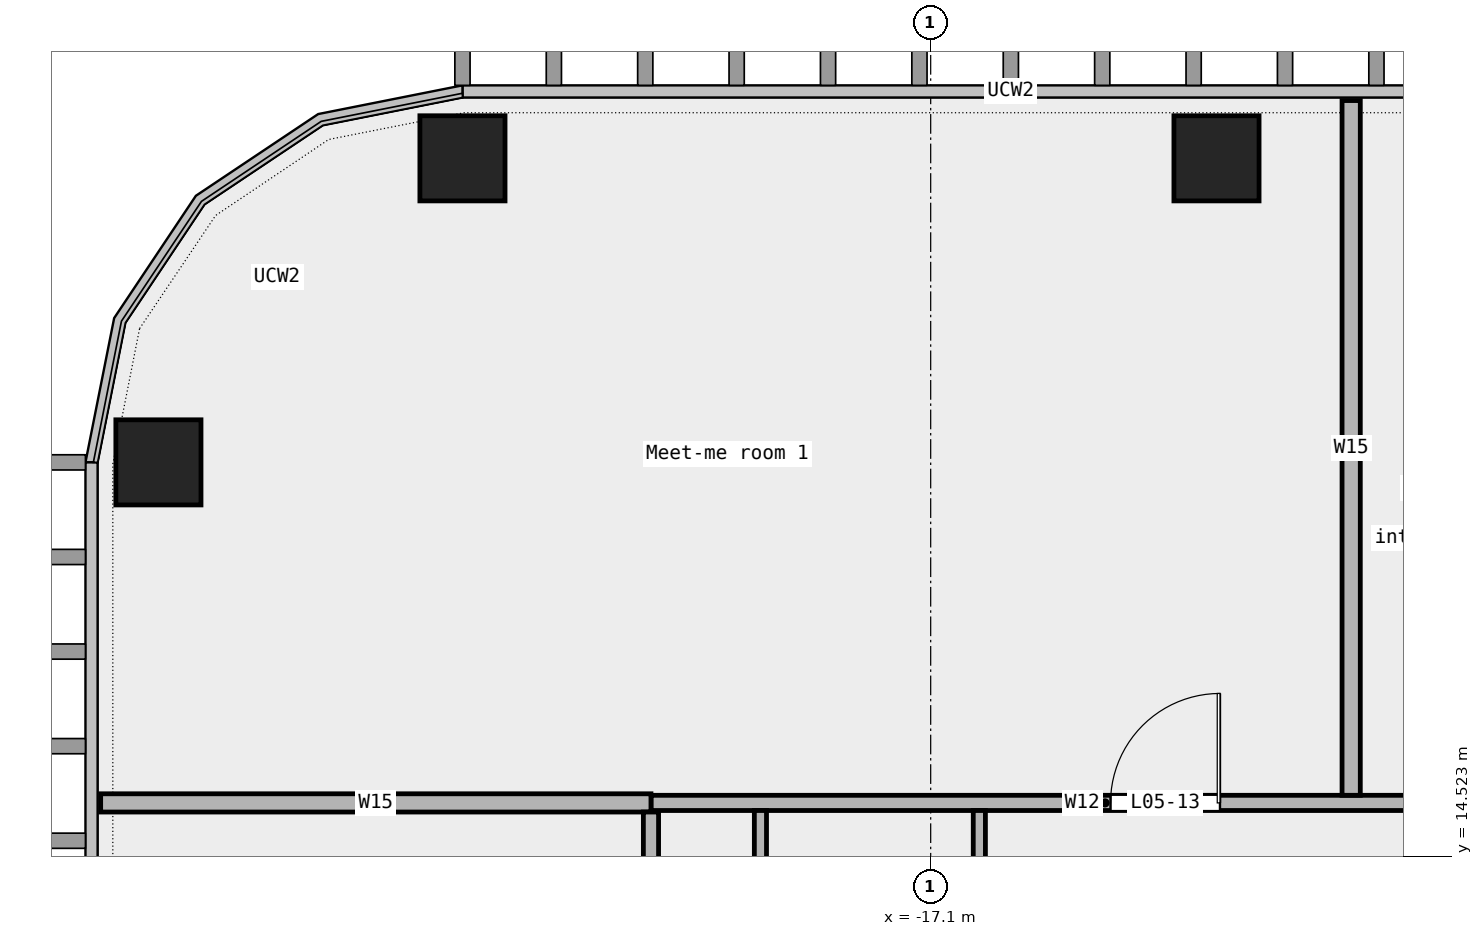
"""IFC4 building model, lengths in metres.
Left out: names, types, materials, properties, quantities, classifications, styles, units other than length and angle.
Written with IfcOpenShell. Run it as: python <this file> out.ifc"""

import sys

from ifc_helpers import new_model, si_unit, direction, frame, frame_2d, origin, origin_2d, place, context, subcontext, project, spatial, rectangle, extrude, element, fill, save


model = new_model("IFC4")
c1 = context("Model", 3, precision=1e-05, world=origin(), true_north=direction((0.0, 1.0)))
c2 = subcontext(c1, "Body", "Model", "MODEL_VIEW")
j1 = project(units=[si_unit("LENGTHUNIT", "METRE"), si_unit("PLANEANGLEUNIT", "RADIAN")], contexts=[c1])
p1 = place(None, origin())
s1 = spatial("IfcSite", under=j1, at=p1, CompositionType="ELEMENT")
p2 = place(p1, origin())
s2 = spatial("IfcBuilding", under=s1, at=p2, CompositionType="ELEMENT")
p3 = place(p2, frame((0.0, 0.0, 31.0)))
s3 = spatial("IfcBuildingStorey", under=s2, at=p3, CompositionType="ELEMENT", Elevation=31.0)
for number, where, z_axis, x_axis in (
    (1, (-12.4, 26.0, 0.0), (0.0, 0.0, 1.0), (1.0, 0.0, 0.0)),
    (2, (-24.8, 26.0, 0.0), (0.0, 0.0, 1.0), (1.0, 0.0, 0.0)),
    (3, (-29.8, 21.0, 0.0), (0.0, 0.0, 1.0), (1.0, 0.0, 0.0)),
):
    element("IfcColumn", number, at=place(p3, frame(where, z_axis=z_axis, x_axis=x_axis)), inside=s3, PredefinedType="COLUMN", context=c2, shape_type="SweptSolid", body=[
        extrude(rectangle(XDim=1.4, YDim=1.4, at=origin_2d()), origin(), (0.0, 0.0, 1.0), 4.35),
    ])
p4 = place(p3, frame((-21.7, 15.4, 0.0), z_axis=(0.0, 0.0, 1.0), x_axis=(1.0, 0.0, 0.0)))
e4 = element("IfcWall", 4, at=p4, inside=s3, PredefinedType="PARTITIONING", context=c2, shape_type="SweptSolid", body=[
    extrude(rectangle(XDim=14.935, YDim=0.25, at=frame_2d((7.468, 0.0))), origin(), (0.0, 0.0, 1.0), 4.35),
])
p5 = place(p4, frame((12.775, 0.0, 0.0)))
e5 = element("IfcOpeningElement", 5, at=p5, cuts=e4, PredefinedType="OPENING", context=c2, shape_type="SweptSolid", body=[
    extrude(rectangle(XDim=0.9, YDim=2.1, at=frame_2d((0.45, 1.05))), frame((0.0, 0.137, 0.0), z_axis=(0.0, -1.0, 0.0), x_axis=(1.0, 0.0, 0.0)), (0.0, 0.0, 1.0), 0.274),
])
p6 = place(p4, frame((7.558, 0.0, 0.0)))
e6 = element("IfcOpeningElement", 6, at=p6, cuts=e4, PredefinedType="OPENING", context=c2, shape_type="SweptSolid", body=[
    extrude(rectangle(XDim=1.8, YDim=2.1, at=frame_2d((0.9, 1.05))), frame((0.0, 0.137, 0.0), z_axis=(0.0, -1.0, 0.0), x_axis=(1.0, 0.0, 0.0)), (0.0, 0.0, 1.0), 0.274),
])
p7 = place(p3, frame((-30.75, 15.4, 0.0), z_axis=(0.0, 0.0, 1.0), x_axis=(1.0, 0.0, 0.0)))
e7 = element("IfcWall", 7, at=p7, inside=s3, PredefinedType="PARTITIONING", context=c2, shape_type="SweptSolid", body=[
    extrude(rectangle(XDim=9.05, YDim=0.3, at=frame_2d((4.525, 0.0))), origin(), (0.0, 0.0, 1.0), 4.35),
])
p8 = place(p3, frame((-21.7, 2.46, 0.0), z_axis=(0.0, 0.0, 1.0), x_axis=(0.0, 1.0, 0.0)))
e8 = element("IfcWall", 8, at=p8, inside=s3, PredefinedType="PARTITIONING", context=c2, shape_type="SweptSolid", body=[
    extrude(rectangle(XDim=12.79, YDim=0.25, at=frame_2d((6.395, 0.0))), origin(), (0.0, 0.0, 1.0), 4.35),
])
p9 = place(p8, frame((5.495, 0.0, 0.0)))
e9 = element("IfcOpeningElement", 9, at=p9, cuts=e8, PredefinedType="OPENING", context=c2, shape_type="SweptSolid", body=[
    extrude(rectangle(XDim=1.8, YDim=2.1, at=frame_2d((0.9, 1.05))), frame((0.0, 0.137, 0.0), z_axis=(0.0, -1.0, 0.0), x_axis=(1.0, 0.0, 0.0)), (0.0, 0.0, 1.0), 0.274),
])
p10 = place(p3, frame((-19.9, 9.78, 0.0), z_axis=(0.0, 0.0, 1.0), x_axis=(0.0, 1.0, 0.0)))
e10 = element("IfcWall", 10, at=p10, inside=s3, PredefinedType="PARTITIONING", context=c2, shape_type="SweptSolid", body=[
    extrude(rectangle(XDim=5.495, YDim=0.2, at=frame_2d((2.748, 0.0))), origin(), (0.0, 0.0, 1.0), 4.35),
])
p11 = place(p3, frame((-16.3, 11.8, 0.0), z_axis=(0.0, 0.0, 1.0), x_axis=(0.0, 1.0, 0.0)))
e11 = element("IfcWall", 11, at=p11, inside=s3, PredefinedType="PARTITIONING", context=c2, shape_type="SweptSolid", body=[
    extrude(rectangle(XDim=3.475, YDim=0.2, at=frame_2d((1.737, 0.0))), origin(), (0.0, 0.0, 1.0), 4.35),
])
p12 = place(p11, frame((1.288, 0.0, 0.0)))
e12 = element("IfcOpeningElement", 12, at=p12, cuts=e11, PredefinedType="OPENING", context=c2, shape_type="SweptSolid", body=[
    extrude(rectangle(XDim=0.9, YDim=2.1, at=frame_2d((0.45, 1.05))), frame((0.0, 0.112, 0.0), z_axis=(0.0, -1.0, 0.0), x_axis=(1.0, 0.0, 0.0)), (0.0, 0.0, 1.0), 0.224),
])
p13 = place(p3, frame((-10.185, 15.525, 0.0), z_axis=(0.0, 0.0, 1.0), x_axis=(0.0, 1.0, 0.0)))
e13 = element("IfcWall", 13, at=p13, inside=s3, PredefinedType="PARTITIONING", context=c2, shape_type="SweptSolid", body=[
    extrude(rectangle(XDim=11.425, YDim=0.3, at=frame_2d((5.712, 0.0))), origin(), (0.0, 0.0, 1.0), 4.35),
])
p14 = place(p6, origin())
e14 = element("IfcDoor", 14, at=p14, inside=s3, OperationType="DOUBLE_DOOR_SINGLE_SWING", PredefinedType="DOOR", context=c2, shape_type="SweptSolid", body=[
    extrude(rectangle(XDim=1.8, YDim=2.1, at=frame_2d((0.9, 1.05))), frame((0.0, 0.025, 0.0), z_axis=(0.0, -1.0, 0.0), x_axis=(1.0, 0.0, 0.0)), (0.0, 0.0, 1.0), 0.05),
])
fill(e6, e14)
save(model, sys.argv[1])
